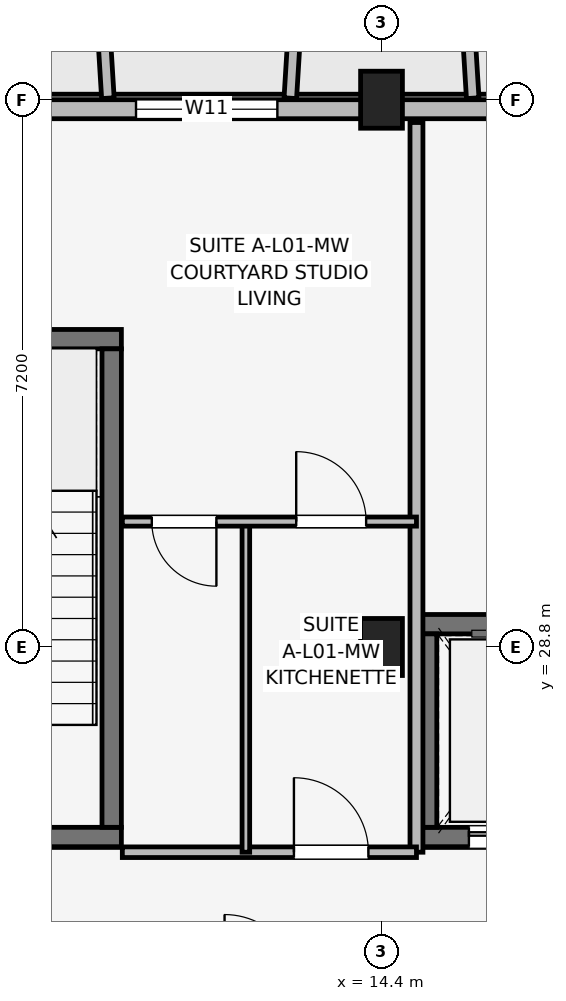
"""IFC4 building model, lengths in metres.
Left out: names, types, materials, properties, quantities, classifications, styles, units other than length and angle.
Written with IfcOpenShell. Run it as: python <this file> out.ifc"""

import sys

from ifc_helpers import new_model, si_unit, direction, frame, frame_2d, origin, origin_2d, place, context, subcontext, project, spatial, rectangle, extrude, element, fill, save


model = new_model("IFC4")
c1 = context("Model", 3, precision=1e-05, world=origin(), true_north=direction((0.0, 1.0)))
c2 = subcontext(c1, "Body", "Model", "MODEL_VIEW")
j1 = project(units=[si_unit("LENGTHUNIT", "METRE"), si_unit("PLANEANGLEUNIT", "RADIAN")], contexts=[c1])
p1 = place(None, origin())
s1 = spatial("IfcSite", under=j1, at=p1, CompositionType="ELEMENT")
p2 = place(p1, origin())
s2 = spatial("IfcBuilding", under=s1, at=p2, CompositionType="ELEMENT")
p3 = place(p2, frame((0.0, 0.0, 4.5)))
s3 = spatial("IfcBuildingStorey", under=s2, at=p3, CompositionType="ELEMENT", Elevation=4.5)
for number, where, z_axis, x_axis in (
    (1, (14.4, 28.8, 0.0), (0.0, 0.0, 1.0), (1.0, 0.0, 0.0)),
    (2, (14.4, 36.0, 0.0), (0.0, 0.0, 1.0), (1.0, 0.0, 0.0)),
):
    element("IfcColumn", number, at=place(p3, frame(where, z_axis=z_axis, x_axis=x_axis)), inside=s3, PredefinedType="COLUMN", context=c2, shape_type="SweptSolid", body=[
        extrude(rectangle(XDim=0.55, YDim=0.75, at=origin_2d()), origin(), (0.0, 0.0, 1.0), 4.2),
    ])
p4 = place(p3, frame((7.673, 26.3, 0.0), z_axis=(0.0, 0.0, 1.0), x_axis=(1.0, 0.0, 0.0)))
e3 = element("IfcWall", 3, at=p4, inside=s3, PredefinedType="SHEAR", context=c2, shape_type="SweptSolid", body=[
    extrude(rectangle(XDim=3.305, YDim=0.255, at=frame_2d((1.652, 0.0))), origin(), (0.0, 0.0, 1.0), 4.2),
])
p5 = place(p4, frame((2.177, 0.0, 0.0), z_axis=(0.0, 0.0, 1.0), x_axis=(-1.0, 0.0, 0.0)))
e4 = element("IfcOpeningElement", 4, at=p5, cuts=e3, PredefinedType="OPENING", context=c2, shape_type="SweptSolid", body=[
    extrude(rectangle(XDim=1.05, YDim=2.12, at=frame_2d((0.525, 1.06))), frame((0.0, 0.137, 0.0), z_axis=(0.0, -1.0, 0.0), x_axis=(1.0, 0.0, 0.0)), (0.0, 0.0, 1.0), 0.275),
])
p6 = place(p3, frame((7.673, 32.85, 0.0), z_axis=(0.0, 0.0, 1.0), x_axis=(1.0, 0.0, 0.0)))
e5 = element("IfcWall", 5, at=p6, inside=s3, PredefinedType="SHEAR", context=c2, shape_type="SweptSolid", body=[
    extrude(rectangle(XDim=3.305, YDim=0.255, at=frame_2d((1.652, 0.0))), origin(), (0.0, 0.0, 1.0), 4.2),
])
p7 = place(p3, frame((10.85, 26.427, 0.0), z_axis=(0.0, 0.0, 1.0), x_axis=(0.0, 1.0, 0.0)))
e6 = element("IfcWall", 6, at=p7, inside=s3, PredefinedType="SHEAR", context=c2, shape_type="SweptSolid", body=[
    extrude(rectangle(XDim=6.295, YDim=0.255, at=frame_2d((3.147, 0.0))), origin(), (0.0, 0.0, 1.0), 4.2),
])
p8 = place(p3, frame((14.873, 26.3, 0.0), z_axis=(0.0, 0.0, 1.0), x_axis=(1.0, 0.0, 0.0)))
e7 = element("IfcWall", 7, at=p8, inside=s3, PredefinedType="SHEAR", context=c2, shape_type="SweptSolid", body=[
    extrude(rectangle(XDim=2.455, YDim=0.255, at=frame_2d((1.228, 0.0))), origin(), (0.0, 0.0, 1.0), 4.2),
])
p9 = place(p8, frame((0.677, 0.0, 0.0)))
e8 = element("IfcOpeningElement", 8, at=p9, cuts=e7, PredefinedType="OPENING", context=c2, shape_type="SweptSolid", body=[
    extrude(rectangle(XDim=1.1, YDim=2.15, at=frame_2d((0.55, 1.075))), frame((0.0, 0.137, 0.0), z_axis=(0.0, -1.0, 0.0), x_axis=(1.0, 0.0, 0.0)), (0.0, 0.0, 1.0), 0.275),
])
p10 = place(p3, frame((14.873, 29.1, 0.0), z_axis=(0.0, 0.0, 1.0), x_axis=(1.0, 0.0, 0.0)))
e9 = element("IfcWall", 9, at=p10, inside=s3, PredefinedType="SHEAR", context=c2, shape_type="SweptSolid", body=[
    extrude(rectangle(XDim=2.455, YDim=0.255, at=frame_2d((1.228, 0.0))), origin(), (0.0, 0.0, 1.0), 4.2),
])
p11 = place(p3, frame((15.0, 26.427, 0.0), z_axis=(0.0, 0.0, 1.0), x_axis=(0.0, 1.0, 0.0)))
e10 = element("IfcWall", 10, at=p11, inside=s3, PredefinedType="SHEAR", context=c2, shape_type="SweptSolid", body=[
    extrude(rectangle(XDim=2.545, YDim=0.255, at=frame_2d((1.272, 0.0))), origin(), (0.0, 0.0, 1.0), 4.2),
])
p12 = place(p3, frame((32.6, 35.875, 0.0), z_axis=(0.0, 0.0, 1.0), x_axis=(-1.0, 0.0, 0.0)))
e11 = element("IfcWall", 11, at=p12, inside=s3, PredefinedType="SOLIDWALL", context=c2, shape_type="SweptSolid", body=[
    extrude(rectangle(XDim=29.2, YDim=0.25, at=frame_2d((14.6, 0.0))), origin(), (0.0, 0.0, 1.0), 3.48),
])
p13 = place(p12, frame((28.7, 0.0, 0.0), z_axis=(0.0, 0.0, 1.0), x_axis=(-1.0, 0.0, 0.0)))
e12 = element("IfcOpeningElement", 12, at=p13, cuts=e11, PredefinedType="OPENING", context=c2, shape_type="SweptSolid", body=[
    extrude(rectangle(XDim=1.8, YDim=2.15, at=frame_2d((0.9, 1.075))), frame((0.0, 0.135, 0.0), z_axis=(0.0, -1.0, 0.0), x_axis=(1.0, 0.0, 0.0)), (0.0, 0.0, 1.0), 0.27),
])
p14 = place(p12, frame((2.15, 0.0, 0.0), z_axis=(0.0, 0.0, 1.0), x_axis=(-1.0, 0.0, 0.0)))
e13 = element("IfcOpeningElement", 13, at=p14, cuts=e11, PredefinedType="OPENING", context=c2, shape_type="SweptSolid", body=[
    extrude(rectangle(XDim=1.5, YDim=2.15, at=frame_2d((0.75, 1.075))), frame((0.0, 0.135, 0.0), z_axis=(0.0, -1.0, 0.0), x_axis=(1.0, 0.0, 0.0)), (0.0, 0.0, 1.0), 0.27),
])
p15 = place(p12, frame((14.955, 0.0, 0.5)))
e14 = element("IfcOpeningElement", 14, at=p15, cuts=e11, PredefinedType="OPENING", context=c2, shape_type="SweptSolid", body=[
    extrude(rectangle(XDim=0.9, YDim=1.8, at=frame_2d((0.45, 0.9))), frame((0.0, 0.135, 0.0), z_axis=(0.0, -1.0, 0.0), x_axis=(1.0, 0.0, 0.0)), (0.0, 0.0, 1.0), 0.27),
])
p16 = place(p12, frame((7.675, 0.0, 0.7)))
e15 = element("IfcOpeningElement", 15, at=p16, cuts=e11, PredefinedType="OPENING", context=c2, shape_type="SweptSolid", body=[
    extrude(rectangle(XDim=2.0, YDim=1.65, at=frame_2d((1.0, 0.825))), frame((0.0, 0.135, 0.0), z_axis=(0.0, -1.0, 0.0), x_axis=(1.0, 0.0, 0.0)), (0.0, 0.0, 1.0), 0.27),
])
p17 = place(p12, frame((19.57, 0.0, 0.7)))
e16 = element("IfcOpeningElement", 16, at=p17, cuts=e11, PredefinedType="OPENING", context=c2, shape_type="SweptSolid", body=[
    extrude(rectangle(XDim=1.86, YDim=1.6, at=frame_2d((0.93, 0.8))), frame((0.0, 0.135, 0.0), z_axis=(0.0, -1.0, 0.0), x_axis=(1.0, 0.0, 0.0)), (0.0, 0.0, 1.0), 0.27),
])
for number, where, z_axis, x_axis in (
    (17, (10.8, 36.02, 0.0), (0.0, 0.0, 1.0), (-0.061, 0.998, 0.0)),
    (18, (13.2, 36.02, 0.0), (0.0, 0.0, 1.0), (0.061, 0.998, 0.0)),
):
    element("IfcWall", number, at=place(p3, frame(where, z_axis=z_axis, x_axis=x_axis)), inside=s3, PredefinedType="ELEMENTEDWALL", context=c2, shape_type="SweptSolid", body=[
        extrude(rectangle(XDim=1.964, YDim=0.165, at=frame_2d((0.982, 0.0))), origin(), (0.0, 0.0, 1.0), 3.58),
    ])
p18 = place(p3, frame((15.6, 36.02, 0.0), z_axis=(0.0, 0.0, 1.0), x_axis=(-0.061170732449, 0.998127317276, 0.0)))
e19 = element("IfcWall", 19, at=p18, inside=s3, PredefinedType="ELEMENTEDWALL", context=c2, shape_type="SweptSolid", body=[
    extrude(rectangle(XDim=1.964, YDim=0.165, at=frame_2d((0.982, 0.0))), origin(), (0.0, 0.0, 1.0), 3.6),
])
p19 = place(p3, frame((14.86, 26.1, 0.0), z_axis=(0.0, 0.0, 1.0), x_axis=(0.0, 1.0, 0.0)))
e20 = element("IfcWall", 20, at=p19, inside=s3, PredefinedType="PARTITIONING", context=c2, shape_type="SweptSolid", body=[
    extrude(rectangle(XDim=9.6, YDim=0.17, at=frame_2d((4.8, 0.0))), origin(), (0.0, 0.0, 1.0), 3.25),
])
p20 = place(p3, frame((10.99, 26.1, 0.0), z_axis=(0.0, 0.0, 1.0), x_axis=(1.0, 0.0, 0.0)))
e21 = element("IfcWall", 21, at=p20, inside=s3, PredefinedType="PARTITIONING", context=c2, shape_type="SweptSolid", body=[
    extrude(rectangle(XDim=3.87, YDim=0.14, at=frame_2d((1.935, 0.0))), origin(), (0.0, 0.0, 1.0), 3.25),
])
p21 = place(p20, frame((2.258, 0.0, 0.0)))
e22 = element("IfcOpeningElement", 22, at=p21, cuts=e21, PredefinedType="OPENING", context=c2, shape_type="SweptSolid", body=[
    extrude(rectangle(XDim=0.98, YDim=2.1, at=frame_2d((0.49, 1.05))), frame((0.0, 0.08, 0.0), z_axis=(0.0, -1.0, 0.0), x_axis=(1.0, 0.0, 0.0)), (0.0, 0.0, 1.0), 0.16),
])
p22 = place(p3, frame((12.615, 26.1, 0.0), z_axis=(0.0, 0.0, 1.0), x_axis=(0.0, 1.0, 0.0)))
e23 = element("IfcWall", 23, at=p22, inside=s3, PredefinedType="PARTITIONING", context=c2, shape_type="SweptSolid", body=[
    extrude(rectangle(XDim=4.35, YDim=0.1, at=frame_2d((2.175, 0.0))), origin(), (0.0, 0.0, 1.0), 3.25),
])
p23 = place(p3, frame((10.99, 30.45, 0.0), z_axis=(0.0, 0.0, 1.0), x_axis=(1.0, 0.0, 0.0)))
e24 = element("IfcWall", 24, at=p23, inside=s3, PredefinedType="PARTITIONING", context=c2, shape_type="SweptSolid", body=[
    extrude(rectangle(XDim=3.87, YDim=0.12, at=frame_2d((1.935, 0.0))), origin(), (0.0, 0.0, 1.0), 3.25),
])
p24 = place(p23, frame((1.238, 0.0, 0.0), z_axis=(0.0, 0.0, 1.0), x_axis=(-1.0, 0.0, 0.0)))
e25 = element("IfcOpeningElement", 25, at=p24, cuts=e24, PredefinedType="OPENING", context=c2, shape_type="SweptSolid", body=[
    extrude(rectangle(XDim=0.85, YDim=2.08, at=frame_2d((0.425, 1.04))), frame((0.0, 0.07, 0.0), z_axis=(0.0, -1.0, 0.0), x_axis=(1.0, 0.0, 0.0)), (0.0, 0.0, 1.0), 0.14),
])
p25 = place(p23, frame((2.288, 0.0, 0.0)))
e26 = element("IfcOpeningElement", 26, at=p25, cuts=e24, PredefinedType="OPENING", context=c2, shape_type="SweptSolid", body=[
    extrude(rectangle(XDim=0.92, YDim=2.08, at=frame_2d((0.46, 1.04))), frame((0.0, 0.07, 0.0), z_axis=(0.0, -1.0, 0.0), x_axis=(1.0, 0.0, 0.0)), (0.0, 0.0, 1.0), 0.14),
])
p26 = place(p17, origin())
e27 = element("IfcWindow", 27, at=p26, inside=s3, PartitioningType="SINGLE_PANEL", PredefinedType="WINDOW", context=c2, shape_type="SweptSolid", body=[
    extrude(rectangle(XDim=1.86, YDim=1.6, at=frame_2d((0.93, 0.8))), frame((0.0, 0.03, 0.0), z_axis=(0.0, -1.0, 0.0), x_axis=(1.0, 0.0, 0.0)), (0.0, 0.0, 1.0), 0.06),
])
fill(e16, e27)
p27 = place(p21, origin())
e28 = element("IfcDoor", 28, at=p27, inside=s3, OperationType="SINGLE_SWING_LEFT", PredefinedType="DOOR", context=c2, shape_type="SweptSolid", body=[
    extrude(rectangle(XDim=0.98, YDim=2.1, at=frame_2d((0.49, 1.05))), frame((0.0, 0.025, 0.0), z_axis=(0.0, -1.0, 0.0), x_axis=(1.0, 0.0, 0.0)), (0.0, 0.0, 1.0), 0.05),
])
fill(e22, e28)
p28 = place(p24, origin())
e29 = element("IfcDoor", 29, at=p28, inside=s3, OperationType="SINGLE_SWING_RIGHT", PredefinedType="DOOR", context=c2, shape_type="SweptSolid", body=[
    extrude(rectangle(XDim=0.85, YDim=2.08, at=frame_2d((0.425, 1.04))), frame((0.0, 0.025, 0.0), z_axis=(0.0, -1.0, 0.0), x_axis=(1.0, 0.0, 0.0)), (0.0, 0.0, 1.0), 0.05),
])
fill(e25, e29)
p29 = place(p25, origin())
e30 = element("IfcDoor", 30, at=p29, inside=s3, OperationType="SINGLE_SWING_LEFT", PredefinedType="DOOR", context=c2, shape_type="SweptSolid", body=[
    extrude(rectangle(XDim=0.92, YDim=2.08, at=frame_2d((0.46, 1.04))), frame((0.0, 0.025, 0.0), z_axis=(0.0, -1.0, 0.0), x_axis=(1.0, 0.0, 0.0)), (0.0, 0.0, 1.0), 0.05),
])
fill(e26, e30)
p30 = place(p9, origin())
e31 = element("IfcDoor", 31, at=p30, inside=s3, OperationType="SLIDING_TO_LEFT", PredefinedType="DOOR", context=c2, shape_type="SweptSolid", body=[
    extrude(rectangle(XDim=1.1, YDim=2.15, at=frame_2d((0.55, 1.075))), frame((0.0, 0.025, 0.0), z_axis=(0.0, -1.0, 0.0), x_axis=(1.0, 0.0, 0.0)), (0.0, 0.0, 1.0), 0.05),
])
fill(e8, e31)
save(model, sys.argv[1])
